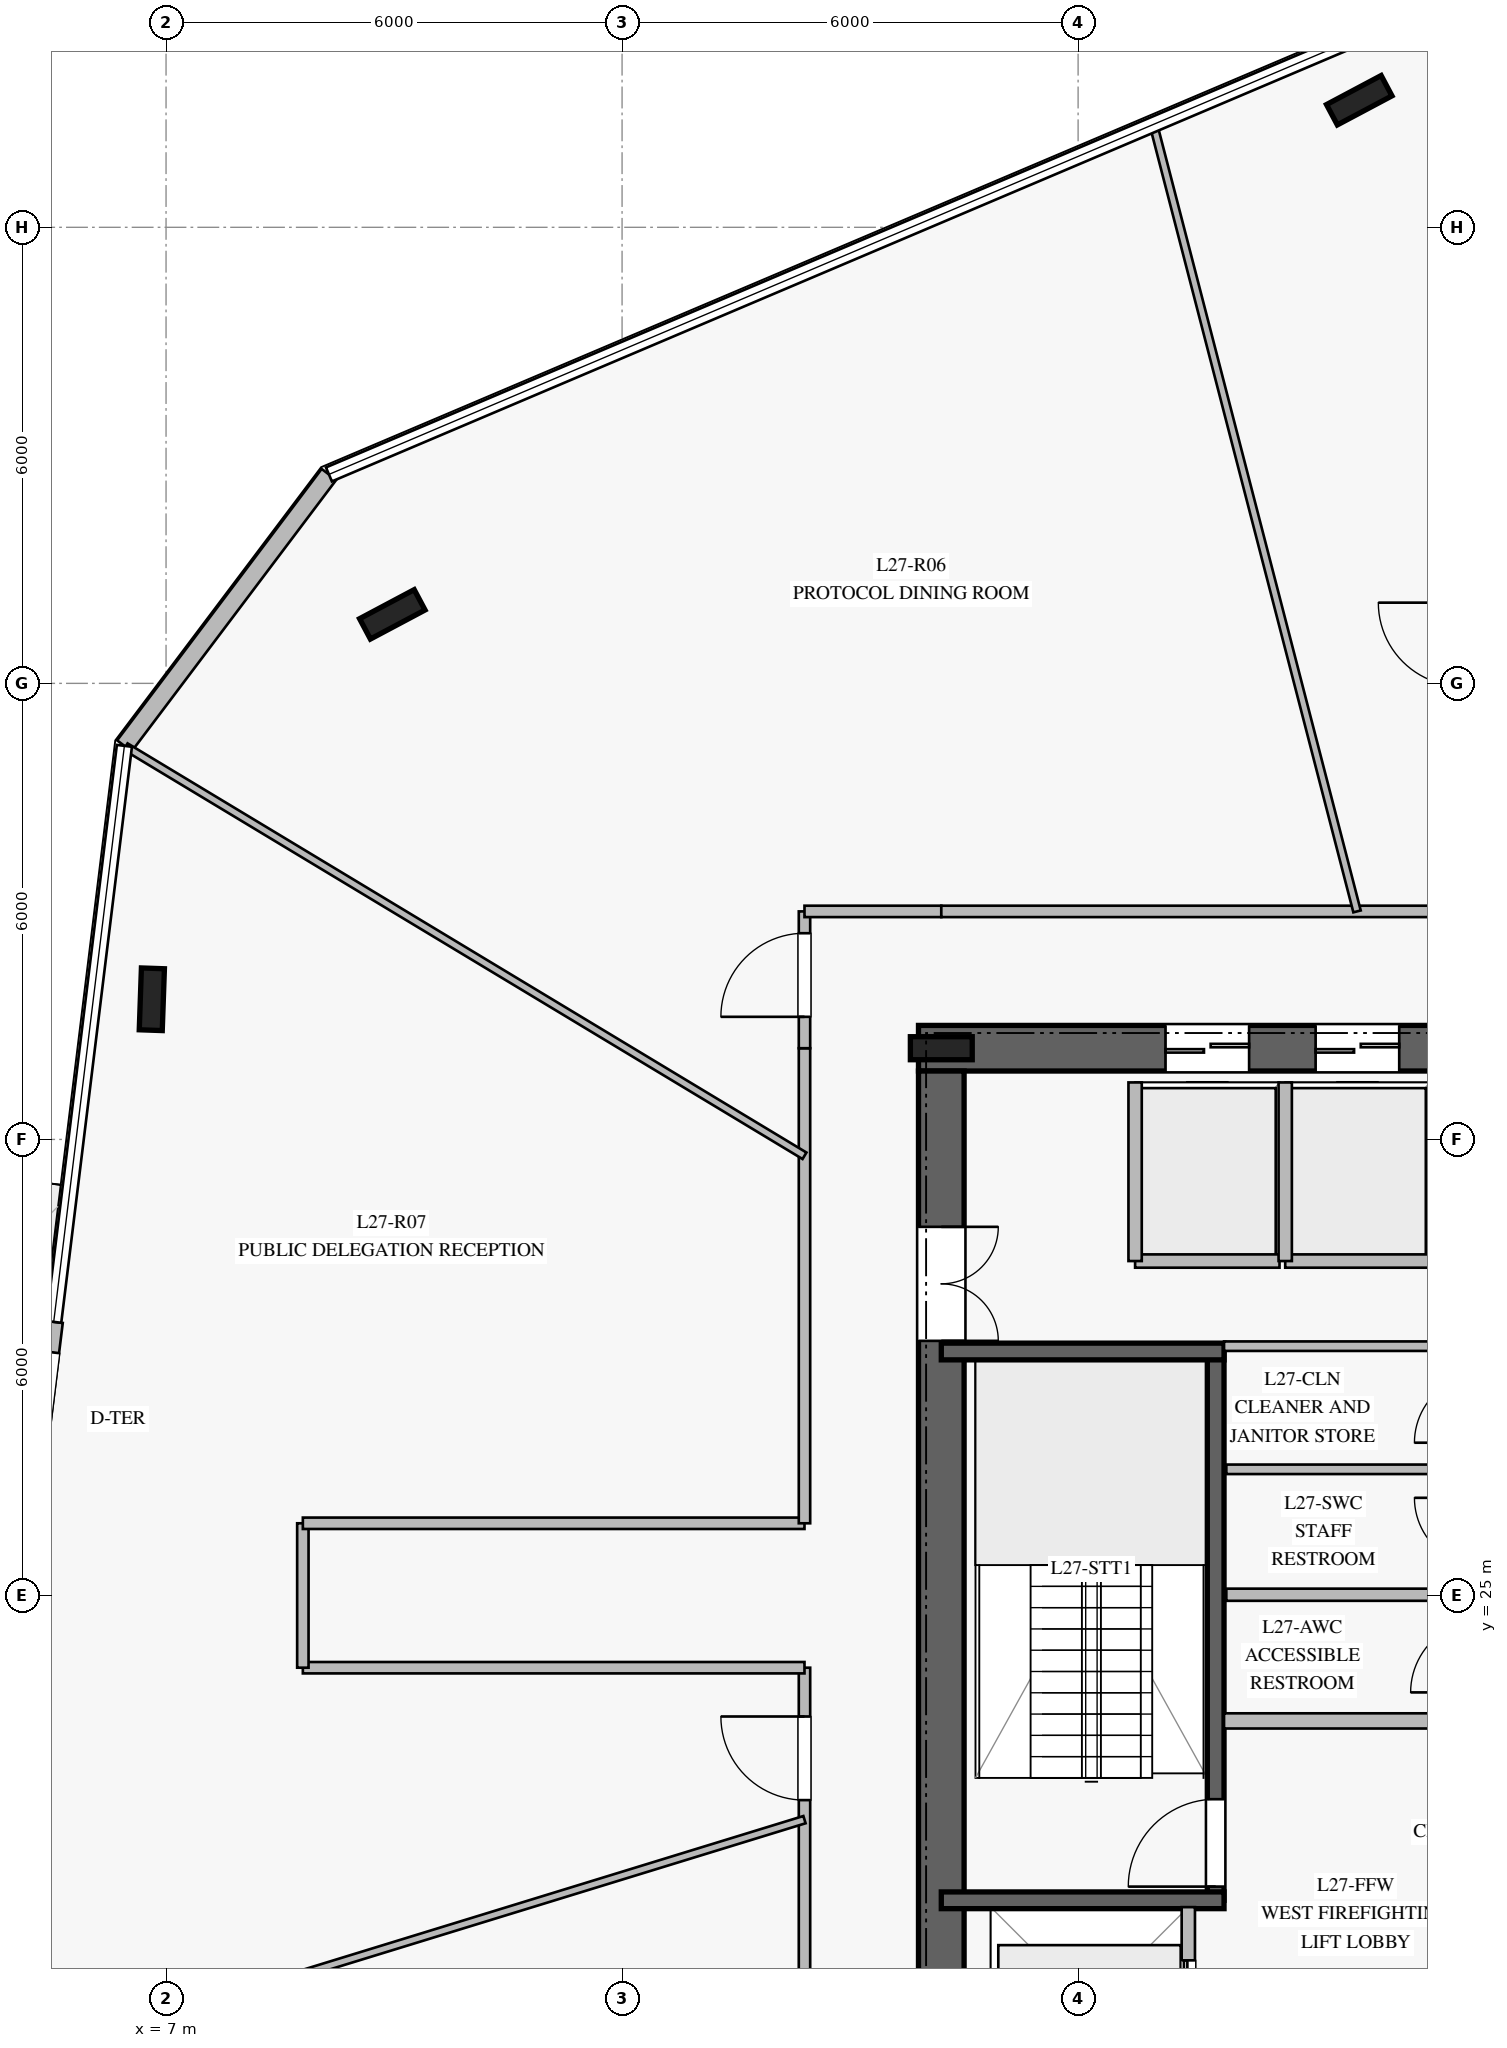
"""IFC4 building model, lengths in metres.
Left out: names, types, materials, properties, quantities, classifications, styles, units other than length and angle.
Written with IfcOpenShell. Run it as: python <this file> out.ifc"""

import sys

from ifc_helpers import new_model, si_unit, direction, frame, frame_2d, origin, origin_2d, place, context, subcontext, project, spatial, rectangle, i_section, extrude, element, fill, save


model = new_model("IFC4")
c1 = context("Model", 3, precision=1e-05, world=origin(), true_north=direction((0.0, 1.0)))
c2 = subcontext(c1, "Body", "Model", "MODEL_VIEW")
j1 = project(units=[si_unit("LENGTHUNIT", "METRE"), si_unit("PLANEANGLEUNIT", "RADIAN")], contexts=[c1])
p1 = place(None, origin())
s1 = spatial("IfcSite", under=j1, at=p1, CompositionType="ELEMENT")
p2 = place(p1, origin())
s2 = spatial("IfcBuilding", under=s1, at=p2, CompositionType="ELEMENT")
p3 = place(p2, frame((0.0, 0.0, 114.4)))
s3 = spatial("IfcBuildingStorey", under=s2, at=p3, CompositionType="ELEMENT", Elevation=114.4)
p4 = place(p3, frame((33.1, 32.2, 0.0), z_axis=(0.0, 0.0, 1.0), x_axis=(-1.0, 0.0, 0.0)))
e1 = element("IfcWall", 1, at=p4, inside=s3, PredefinedType="SHEAR", context=c2, shape_type="SweptSolid", body=[
    extrude(rectangle(XDim=16.2, YDim=0.6, at=frame_2d((8.1, 0.0))), origin(), (0.0, 0.0, 1.0), 3.76),
])
p5 = place(p4, frame((5.05, 0.0, 0.0)))
e2 = element("IfcOpeningElement", 2, at=p5, cuts=e1, PredefinedType="OPENING", context=c2, shape_type="SweptSolid", body=[
    extrude(rectangle(XDim=1.2, YDim=2.25, at=frame_2d((0.6, 1.125))), frame((0.0, 0.31, 0.0), z_axis=(0.0, -1.0, 0.0), x_axis=(1.0, 0.0, 0.0)), (0.0, 0.0, 1.0), 0.62),
])
p6 = place(p4, frame((11.85, 0.0, 0.0)))
e3 = element("IfcOpeningElement", 3, at=p6, cuts=e1, PredefinedType="OPENING", context=c2, shape_type="SweptSolid", body=[
    extrude(rectangle(XDim=1.1, YDim=2.2, at=frame_2d((0.55, 1.1))), frame((0.0, 0.31, 0.0), z_axis=(0.0, -1.0, 0.0), x_axis=(1.0, 0.0, 0.0)), (0.0, 0.0, 1.0), 0.62),
])
p7 = place(p4, frame((9.875, 0.0, 0.0)))
e4 = element("IfcOpeningElement", 4, at=p7, cuts=e1, PredefinedType="OPENING", context=c2, shape_type="SweptSolid", body=[
    extrude(rectangle(XDim=1.1, YDim=2.2, at=frame_2d((0.55, 1.1))), frame((0.0, 0.31, 0.0), z_axis=(0.0, -1.0, 0.0), x_axis=(1.0, 0.0, 0.0)), (0.0, 0.0, 1.0), 0.62),
])
p8 = place(p4, frame((7.9, 0.0, 0.0)))
e5 = element("IfcOpeningElement", 5, at=p8, cuts=e1, PredefinedType="OPENING", context=c2, shape_type="SweptSolid", body=[
    extrude(rectangle(XDim=1.1, YDim=2.2, at=frame_2d((0.55, 1.1))), frame((0.0, 0.31, 0.0), z_axis=(0.0, -1.0, 0.0), x_axis=(1.0, 0.0, 0.0)), (0.0, 0.0, 1.0), 0.62),
])
p9 = place(p3, frame((17.2, 31.9, 0.0), z_axis=(0.0, 0.0, 1.0), x_axis=(0.0, -1.0, 0.0)))
e6 = element("IfcWall", 6, at=p9, inside=s3, PredefinedType="SHEAR", context=c2, shape_type="SweptSolid", body=[
    extrude(rectangle(XDim=13.8, YDim=0.6, at=frame_2d((6.9, 0.0))), origin(), (0.0, 0.0, 1.0), 3.76),
])
p10 = place(p9, frame((2.05, 0.0, 0.0)))
e7 = element("IfcOpeningElement", 7, at=p10, cuts=e6, PredefinedType="OPENING", context=c2, shape_type="SweptSolid", body=[
    extrude(rectangle(XDim=1.5, YDim=2.2, at=frame_2d((0.75, 1.1))), frame((0.0, 0.31, 0.0), z_axis=(0.0, -1.0, 0.0), x_axis=(1.0, 0.0, 0.0)), (0.0, 0.0, 1.0), 0.62),
])
p11 = place(p3, frame((17.2, 32.2, 0.0), z_axis=(0.0, 0.0, 1.0), x_axis=(1.0, 0.0, 0.0)))
e8 = element("IfcColumn", 8, at=p11, inside=s3, PredefinedType="COLUMN", context=c2, shape_type="SweptSolid", body=[
    extrude(i_section(OverallWidth=0.303, OverallDepth=0.814, WebThickness=0.021, FlangeThickness=0.04, at=origin_2d()), origin(), (0.0, 0.0, 1.0), 4.0),
])
p12 = place(p3, frame((20.81, 20.99, 0.0), z_axis=(0.0, 0.0, 1.0), x_axis=(0.0, 1.0, 0.0)))
e9 = element("IfcWall", 9, at=p12, inside=s3, PredefinedType="SOLIDWALL", context=c2, shape_type="SweptSolid", body=[
    extrude(rectangle(XDim=7.22, YDim=0.22, at=frame_2d((3.61, 0.0))), origin(), (0.0, 0.0, 1.0), 3.76),
])
p13 = place(p12, frame((0.18, 0.0, 0.0)))
e10 = element("IfcOpeningElement", 10, at=p13, cuts=e9, PredefinedType="OPENING", context=c2, shape_type="SweptSolid", body=[
    extrude(rectangle(XDim=1.15, YDim=2.2, at=frame_2d((0.575, 1.1))), frame((0.0, 0.12, 0.0), z_axis=(0.0, -1.0, 0.0), x_axis=(1.0, 0.0, 0.0)), (0.0, 0.0, 1.0), 0.24),
])
for number, where, z_axis, x_axis in (
    (11, (17.2, 20.99, 0.0), (0.0, 0.0, 1.0), (1.0, 0.0, 0.0)),
    (12, (17.2, 28.21, 0.0), (0.0, 0.0, 1.0), (1.0, 0.0, 0.0)),
):
    element("IfcWall", number, at=place(p3, frame(where, z_axis=z_axis, x_axis=x_axis)), inside=s3, PredefinedType="SOLIDWALL", context=c2, shape_type="SweptSolid", body=[
        extrude(rectangle(XDim=3.72, YDim=0.22, at=frame_2d((1.86, 0.0))), origin(), (0.0, 0.0, 1.0), 3.76),
    ])
for number, where, z_axis, x_axis in (
    (13, (22.699, 44.672, 0.0), (0.0, 0.0, 1.0), (0.883, 0.469, 0.0)),
    (14, (9.977, 37.908, 0.0), (0.0, 0.0, 1.0), (0.883, 0.469, 0.0)),
    (15, (6.813, 32.844, 0.0), (0.0, 0.0, 1.0), (0.035, 0.999, 0.0)),
):
    element("IfcColumn", number, at=place(p3, frame(where, z_axis=z_axis, x_axis=x_axis)), inside=s3, PredefinedType="COLUMN", context=c2, shape_type="SweptSolid", body=[
        extrude(i_section(OverallWidth=0.303, OverallDepth=0.814, WebThickness=0.021, FlangeThickness=0.04, at=origin_2d()), origin(), (0.0, 0.0, 1.0), 4.0),
    ])
p14 = place(p3, frame((9.143, 39.749, 0.0), z_axis=(0.0, 0.0, 1.0), x_axis=(-0.601841660076, -0.798615436989, 0.0)))
e16 = element("IfcWall", 16, at=p14, inside=s3, PredefinedType="STANDARD", context=c2, shape_type="SweptSolid", body=[
    extrude(rectangle(XDim=4.471, YDim=0.24, at=frame_2d((2.236, 0.0))), origin(), (0.0, 0.0, 1.0), 3.76),
])
p15 = place(p3, frame((5.522, 28.6, 0.0), z_axis=(0.0, 0.0, 1.0), x_axis=(-0.122068869435, -0.992521632568, 0.0)))
e17 = element("IfcWall", 17, at=p15, inside=s3, PredefinedType="STANDARD", context=c2, shape_type="SweptSolid", body=[
    extrude(rectangle(XDim=2.4, YDim=0.24, at=frame_2d((1.2, 0.0))), origin(), (0.0, 0.0, 1.0), 3.76),
])
p16 = place(p15, frame((0.4, 0.0, 0.0)))
e18 = element("IfcOpeningElement", 18, at=p16, cuts=e17, PredefinedType="OPENING", context=c2, shape_type="SweptSolid", body=[
    extrude(rectangle(XDim=1.6, YDim=2.25, at=frame_2d((0.8, 1.125))), frame((0.0, 0.13, 0.0), z_axis=(0.0, -1.0, 0.0), x_axis=(1.0, 0.0, 0.0)), (0.0, 0.0, 1.0), 0.26),
])
p17 = place(p3, frame((20.92, 23.35, 0.0), z_axis=(0.0, 0.0, 1.0), x_axis=(1.0, 0.0, 0.0)))
e19 = element("IfcWall", 19, at=p17, inside=s3, PredefinedType="PARTITIONING", context=c2, shape_type="SweptSolid", body=[
    extrude(rectangle(XDim=3.38, YDim=0.2, at=frame_2d((1.69, 0.0))), origin(), (0.0, 0.0, 1.0), 3.76),
])
p18 = place(p3, frame((20.92, 28.28, 0.0), z_axis=(0.0, 0.0, 1.0), x_axis=(1.0, 0.0, 0.0)))
e20 = element("IfcWall", 20, at=p18, inside=s3, PredefinedType="PARTITIONING", context=c2, shape_type="SweptSolid", body=[
    extrude(rectangle(XDim=3.405, YDim=0.125, at=frame_2d((1.703, 0.0))), origin(), (0.0, 0.0, 1.0), 3.76),
])
p19 = place(p3, frame((20.95, 25.01, 0.0), z_axis=(0.0, 0.0, 1.0), x_axis=(1.0, 0.0, 0.0)))
e21 = element("IfcWall", 21, at=p19, inside=s3, PredefinedType="PLUMBINGWALL", context=c2, shape_type="SweptSolid", body=[
    extrude(rectangle(XDim=3.3, YDim=0.16, at=frame_2d((1.65, 0.0))), origin(), (0.0, 0.0, 1.0), 3.76),
])
p20 = place(p3, frame((20.95, 26.66, 0.0), z_axis=(0.0, 0.0, 1.0), x_axis=(1.0, 0.0, 0.0)))
e22 = element("IfcWall", 22, at=p20, inside=s3, PredefinedType="PARTITIONING", context=c2, shape_type="SweptSolid", body=[
    extrude(rectangle(XDim=3.3, YDim=0.125, at=frame_2d((1.65, 0.0))), origin(), (0.0, 0.0, 1.0), 3.76),
])
p21 = place(p3, frame((19.75, 29.4, 0.0), z_axis=(0.0, 0.0, 1.0), x_axis=(1.0, 0.0, 0.0)))
e23 = element("IfcWall", 23, at=p21, inside=s3, PredefinedType="PARTITIONING", context=c2, shape_type="SweptSolid", body=[
    extrude(rectangle(XDim=1.9, YDim=0.175, at=frame_2d((0.95, 0.0))), origin(), (0.0, 0.0, 1.0), 3.76),
])
p22 = place(p3, frame((19.75, 29.4, 0.0), z_axis=(0.0, 0.0, 1.0), x_axis=(0.0, 1.0, 0.0)))
e24 = element("IfcWall", 24, at=p22, inside=s3, PredefinedType="PARTITIONING", context=c2, shape_type="SweptSolid", body=[
    extrude(rectangle(XDim=2.35, YDim=0.175, at=frame_2d((1.175, 0.0))), origin(), (0.0, 0.0, 1.0), 3.76),
])
p23 = place(p3, frame((21.725, 29.4, 0.0), z_axis=(0.0, 0.0, 1.0), x_axis=(1.0, 0.0, 0.0)))
e25 = element("IfcWall", 25, at=p23, inside=s3, PredefinedType="PARTITIONING", context=c2, shape_type="SweptSolid", body=[
    extrude(rectangle(XDim=1.9, YDim=0.175, at=frame_2d((0.95, 0.0))), origin(), (0.0, 0.0, 1.0), 3.76),
])
p24 = place(p3, frame((21.725, 29.4, 0.0), z_axis=(0.0, 0.0, 1.0), x_axis=(0.0, 1.0, 0.0)))
e26 = element("IfcWall", 26, at=p24, inside=s3, PredefinedType="PARTITIONING", context=c2, shape_type="SweptSolid", body=[
    extrude(rectangle(XDim=2.35, YDim=0.175, at=frame_2d((1.175, 0.0))), origin(), (0.0, 0.0, 1.0), 3.76),
])
p25 = place(p3, frame((20.45, 18.3, 0.0), z_axis=(0.0, 0.0, 1.0), x_axis=(0.0, 1.0, 0.0)))
e27 = element("IfcWall", 27, at=p25, inside=s3, PredefinedType="PARTITIONING", context=c2, shape_type="SweptSolid", body=[
    extrude(rectangle(XDim=2.6, YDim=0.175, at=frame_2d((1.3, 0.0))), origin(), (0.0, 0.0, 1.0), 3.76),
])
p26 = place(p25, frame((0.7, 0.0, 0.0)))
e28 = element("IfcOpeningElement", 28, at=p26, cuts=e27, PredefinedType="OPENING", context=c2, shape_type="SweptSolid", body=[
    extrude(rectangle(XDim=1.2, YDim=2.2, at=frame_2d((0.6, 1.1))), frame((0.0, 0.098, 0.0), z_axis=(0.0, -1.0, 0.0), x_axis=(1.0, 0.0, 0.0)), (0.0, 0.0, 1.0), 0.195),
])
p27 = place(p3, frame((15.4, 17.8, 0.0), z_axis=(0.0, 0.0, 1.0), x_axis=(0.0, 1.0, 0.0)))
e29 = element("IfcWall", 29, at=p27, inside=s3, PredefinedType="PARTITIONING", context=c2, shape_type="SweptSolid", body=[
    extrude(rectangle(XDim=6.25, YDim=0.15, at=frame_2d((3.125, 0.0))), origin(), (0.0, 0.0, 1.0), 3.21),
])
p28 = place(p27, frame((4.508, 0.0, 0.0)))
e30 = element("IfcOpeningElement", 30, at=p28, cuts=e29, PredefinedType="OPENING", context=c2, shape_type="SweptSolid", body=[
    extrude(rectangle(XDim=1.1, YDim=2.2, at=frame_2d((0.55, 1.1))), frame((0.0, 0.085, 0.0), z_axis=(0.0, -1.0, 0.0), x_axis=(1.0, 0.0, 0.0)), (0.0, 0.0, 1.0), 0.17),
])
p29 = place(p3, frame((15.4, 24.05, 0.0), z_axis=(0.0, 0.0, 1.0), x_axis=(-1.0, 0.0, 0.0)))
e31 = element("IfcWall", 31, at=p29, inside=s3, PredefinedType="PARTITIONING", context=c2, shape_type="SweptSolid", body=[
    extrude(rectangle(XDim=6.6, YDim=0.15, at=frame_2d((3.3, 0.0))), origin(), (0.0, 0.0, 1.0), 3.05),
])
p30 = place(p3, frame((8.8, 24.05, 0.0), z_axis=(0.0, 0.0, 1.0), x_axis=(0.0, 1.0, 0.0)))
e32 = element("IfcWall", 32, at=p30, inside=s3, PredefinedType="PARTITIONING", context=c2, shape_type="SweptSolid", body=[
    extrude(rectangle(XDim=1.9, YDim=0.15, at=frame_2d((0.95, 0.0))), origin(), (0.0, 0.0, 1.0), 3.3),
])
p31 = place(p3, frame((8.8, 25.95, 0.0), z_axis=(0.0, 0.0, 1.0), x_axis=(1.0, 0.0, 0.0)))
e33 = element("IfcWall", 33, at=p31, inside=s3, PredefinedType="PARTITIONING", context=c2, shape_type="SweptSolid", body=[
    extrude(rectangle(XDim=6.6, YDim=0.15, at=frame_2d((3.3, 0.0))), origin(), (0.0, 0.0, 1.0), 3.05),
])
p32 = place(p3, frame((15.4, 25.95, 0.0), z_axis=(0.0, 0.0, 1.0), x_axis=(0.0, 1.0, 0.0)))
e34 = element("IfcWall", 34, at=p32, inside=s3, PredefinedType="PARTITIONING", context=c2, shape_type="SweptSolid", body=[
    extrude(rectangle(XDim=6.25, YDim=0.15, at=frame_2d((3.125, 0.0))), origin(), (0.0, 0.0, 1.0), 3.21),
])
p33 = place(p3, frame((15.4, 32.2, 0.0), z_axis=(0.0, 0.0, 1.0), x_axis=(0.0, 1.0, 0.0)))
e35 = element("IfcWall", 35, at=p33, inside=s3, PredefinedType="PARTITIONING", context=c2, shape_type="SweptSolid", body=[
    extrude(rectangle(XDim=1.8, YDim=0.15, at=frame_2d((0.9, 0.0))), origin(), (0.0, 0.0, 1.0), 3.21),
])
p34 = place(p33, frame((0.413, 0.0, 0.0)))
e36 = element("IfcOpeningElement", 36, at=p34, cuts=e35, PredefinedType="OPENING", context=c2, shape_type="SweptSolid", body=[
    extrude(rectangle(XDim=1.1, YDim=2.2, at=frame_2d((0.55, 1.1))), frame((0.0, 0.085, 0.0), z_axis=(0.0, -1.0, 0.0), x_axis=(1.0, 0.0, 0.0)), (0.0, 0.0, 1.0), 0.17),
])
p35 = place(p3, frame((15.4, 34.0, 0.0), z_axis=(0.0, 0.0, 1.0), x_axis=(1.0, 0.0, 0.0)))
e37 = element("IfcWall", 37, at=p35, inside=s3, PredefinedType="PARTITIONING", context=c2, shape_type="SweptSolid", body=[
    extrude(rectangle(XDim=1.8, YDim=0.15, at=frame_2d((0.9, 0.0))), origin(), (0.0, 0.0, 1.0), 3.76),
])
p36 = place(p3, frame((17.2, 34.0, 0.0), z_axis=(0.0, 0.0, 1.0), x_axis=(1.0, 0.0, 0.0)))
e38 = element("IfcWall", 38, at=p36, inside=s3, PredefinedType="PARTITIONING", context=c2, shape_type="SweptSolid", body=[
    extrude(rectangle(XDim=6.85, YDim=0.15, at=frame_2d((3.425, 0.0))), origin(), (0.0, 0.0, 1.0), 3.21),
])
p37 = place(p3, frame((22.67, 34.0, 0.0), z_axis=(0.0, 0.0, 1.0), x_axis=(-0.250533593691, 0.968107906399, 0.0)))
e39 = element("IfcWall", 39, at=p37, inside=s3, PredefinedType="MOVABLE", context=c2, shape_type="SweptSolid", body=[
    extrude(rectangle(XDim=10.677, YDim=0.1, at=frame_2d((5.338, 0.0))), origin(), (0.0, 0.0, 1.0), 3.16),
])
p38 = place(p3, frame((15.4, 30.785, 0.0), z_axis=(0.0, 0.0, 1.0), x_axis=(-0.856479099456, 0.51618170463, 0.0)))
e40 = element("IfcWall", 40, at=p38, inside=s3, PredefinedType="MOVABLE", context=c2, shape_type="SweptSolid", body=[
    extrude(rectangle(XDim=10.429, YDim=0.1, at=frame_2d((5.214, 0.0))), origin(), (0.0, 0.0, 1.0), 3.16),
])
p39 = place(p3, frame((15.4, 22.051, 0.0), z_axis=(0.0, 0.0, 1.0), x_axis=(-0.955926859448, -0.293604903544, 0.0)))
e41 = element("IfcWall", 41, at=p39, inside=s3, PredefinedType="MOVABLE", context=c2, shape_type="SweptSolid", body=[
    extrude(rectangle(XDim=11.594, YDim=0.1, at=frame_2d((5.797, 0.0))), origin(), (0.0, 0.0, 1.0), 3.05),
])
p40 = place(p16, frame((1.6, 0.0, 0.0), z_axis=(0.0, 0.0, 1.0), x_axis=(-1.0, 0.0, 0.0)))
e42 = element("IfcDoor", 42, at=p40, inside=s3, OperationType="DOUBLE_DOOR_SINGLE_SWING", PredefinedType="DOOR", context=c2, shape_type="SweptSolid", body=[
    extrude(rectangle(XDim=1.6, YDim=2.25, at=frame_2d((0.8, 1.125))), frame((0.0, 0.025, 0.0), z_axis=(0.0, -1.0, 0.0), x_axis=(1.0, 0.0, 0.0)), (0.0, 0.0, 1.0), 0.05),
])
fill(e18, e42)
p41 = place(p13, origin())
e43 = element("IfcDoor", 43, at=p41, inside=s3, OperationType="SINGLE_SWING_LEFT", PredefinedType="DOOR", context=c2, shape_type="SweptSolid", body=[
    extrude(rectangle(XDim=1.15, YDim=2.2, at=frame_2d((0.575, 1.1))), frame((0.0, 0.025, 0.0), z_axis=(0.0, -1.0, 0.0), x_axis=(1.0, 0.0, 0.0)), (0.0, 0.0, 1.0), 0.05),
])
fill(e10, e43)
p42 = place(p10, origin())
e44 = element("IfcDoor", 44, at=p42, inside=s3, OperationType="DOUBLE_DOOR_SINGLE_SWING", PredefinedType="DOOR", context=c2, shape_type="SweptSolid", body=[
    extrude(rectangle(XDim=1.5, YDim=2.2, at=frame_2d((0.75, 1.1))), frame((0.0, 0.025, 0.0), z_axis=(0.0, -1.0, 0.0), x_axis=(1.0, 0.0, 0.0)), (0.0, 0.0, 1.0), 0.05),
])
fill(e7, e44)
p43 = place(p6, origin())
e45 = element("IfcDoor", 45, at=p43, inside=s3, OperationType="DOUBLE_DOOR_SLIDING", PredefinedType="DOOR", context=c2, shape_type="SweptSolid", body=[
    extrude(rectangle(XDim=1.1, YDim=2.2, at=frame_2d((0.55, 1.1))), frame((0.0, 0.025, 0.0), z_axis=(0.0, -1.0, 0.0), x_axis=(1.0, 0.0, 0.0)), (0.0, 0.0, 1.0), 0.05),
])
fill(e3, e45)
p44 = place(p7, origin())
e46 = element("IfcDoor", 46, at=p44, inside=s3, OperationType="DOUBLE_DOOR_SLIDING", PredefinedType="DOOR", context=c2, shape_type="SweptSolid", body=[
    extrude(rectangle(XDim=1.1, YDim=2.2, at=frame_2d((0.55, 1.1))), frame((0.0, 0.025, 0.0), z_axis=(0.0, -1.0, 0.0), x_axis=(1.0, 0.0, 0.0)), (0.0, 0.0, 1.0), 0.05),
])
fill(e4, e46)
p45 = place(p26, origin())
e47 = element("IfcDoor", 47, at=p45, inside=s3, OperationType="DOUBLE_DOOR_SLIDING", PredefinedType="DOOR", context=c2, shape_type="SweptSolid", body=[
    extrude(rectangle(XDim=1.2, YDim=2.2, at=frame_2d((0.6, 1.1))), frame((0.0, 0.025, 0.0), z_axis=(0.0, -1.0, 0.0), x_axis=(1.0, 0.0, 0.0)), (0.0, 0.0, 1.0), 0.05),
])
fill(e28, e47)
p46 = place(p34, origin())
e48 = element("IfcDoor", 48, at=p46, inside=s3, OperationType="SINGLE_SWING_LEFT", PredefinedType="DOOR", context=c2, shape_type="SweptSolid", body=[
    extrude(rectangle(XDim=1.1, YDim=2.2, at=frame_2d((0.55, 1.1))), frame((0.0, 0.025, 0.0), z_axis=(0.0, -1.0, 0.0), x_axis=(1.0, 0.0, 0.0)), (0.0, 0.0, 1.0), 0.05),
])
fill(e36, e48)
p47 = place(p28, origin())
e49 = element("IfcDoor", 49, at=p47, inside=s3, OperationType="SINGLE_SWING_RIGHT", PredefinedType="DOOR", context=c2, shape_type="SweptSolid", body=[
    extrude(rectangle(XDim=1.1, YDim=2.2, at=frame_2d((0.55, 1.1))), frame((0.0, 0.025, 0.0), z_axis=(0.0, -1.0, 0.0), x_axis=(1.0, 0.0, 0.0)), (0.0, 0.0, 1.0), 0.05),
])
fill(e30, e49)
save(model, sys.argv[1])
